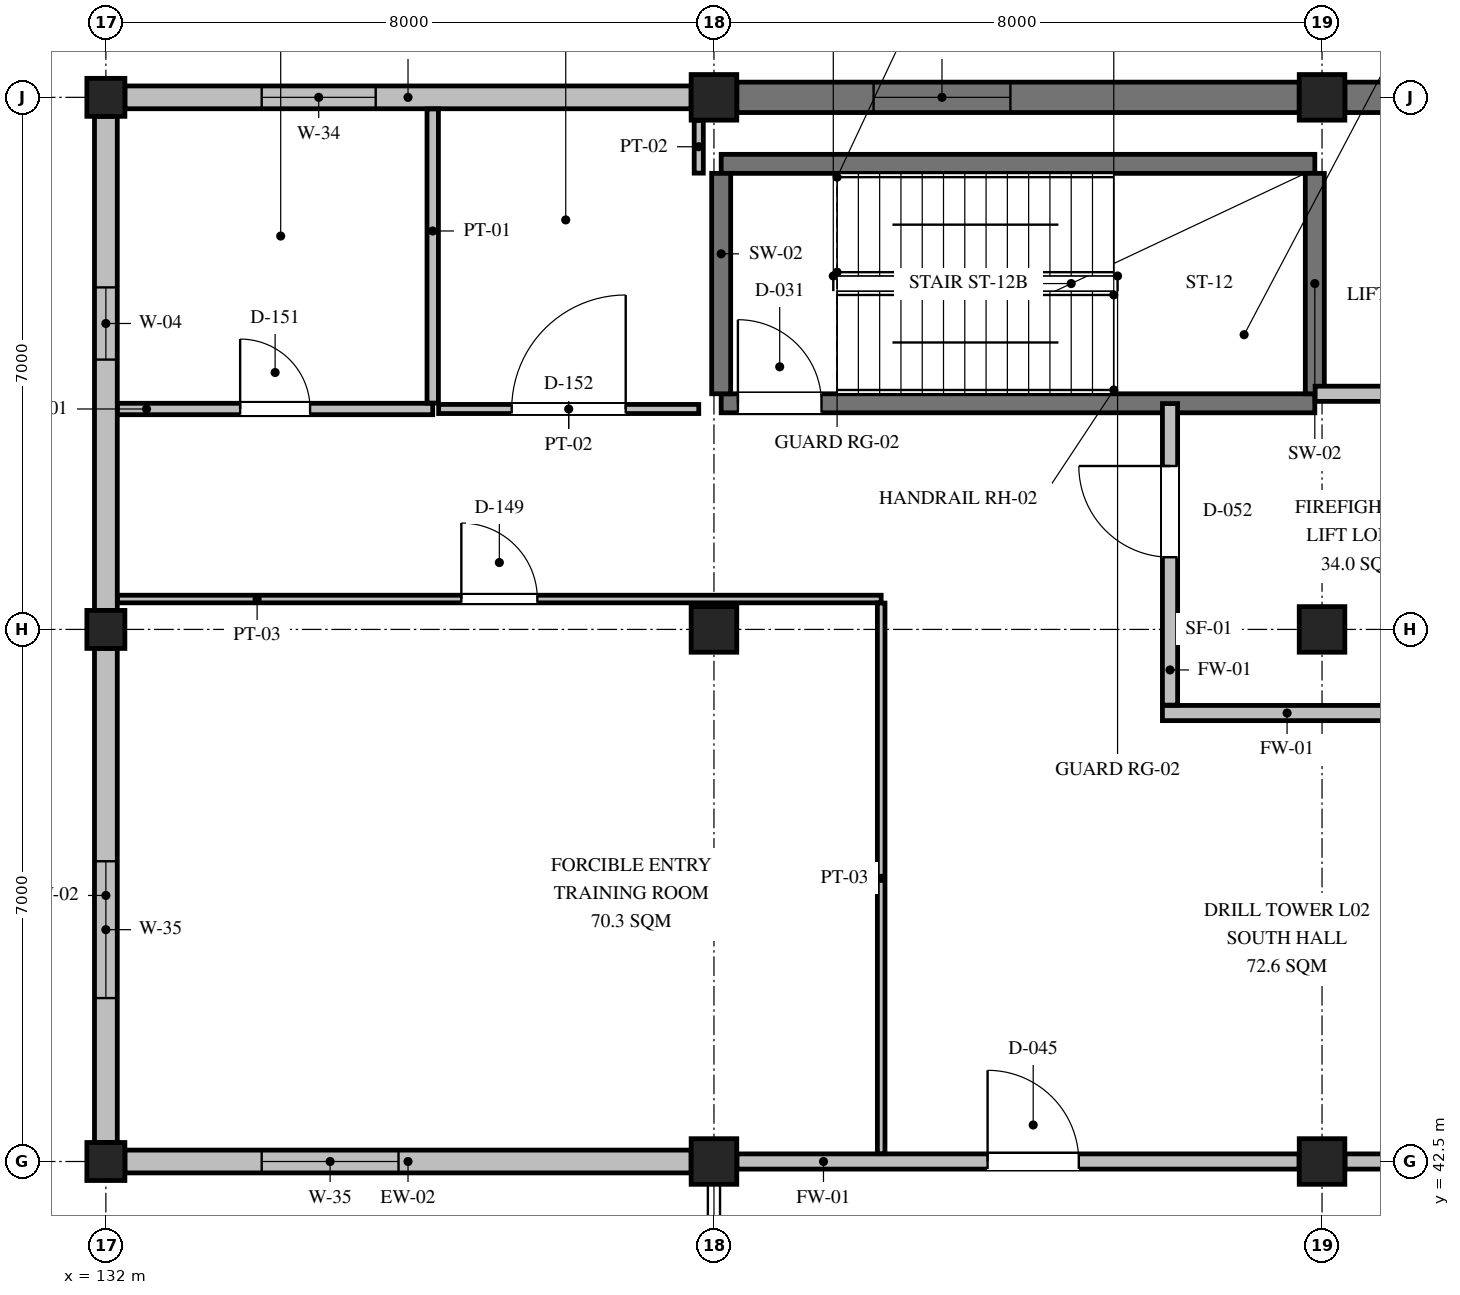
"""IFC4 building model, lengths in metres.
Left out: names, types, materials, properties, quantities, classifications, styles, units other than length and angle.
Written with IfcOpenShell. Run it as: python <this file> out.ifc"""

import sys

from ifc_helpers import new_model, si_unit, direction, frame, frame_2d, origin, origin_2d, place, context, subcontext, project, spatial, rectangle, extrude, element, fill, save


model = new_model("IFC4")
c1 = context("Model", 3, precision=1e-05, world=origin(), true_north=direction((0.0, 1.0)))
c2 = subcontext(c1, "Body", "Model", "MODEL_VIEW")
j1 = project(units=[si_unit("LENGTHUNIT", "METRE"), si_unit("PLANEANGLEUNIT", "RADIAN")], contexts=[c1])
p1 = place(None, origin())
s1 = spatial("IfcSite", under=j1, at=p1, CompositionType="ELEMENT")
p2 = place(p1, origin())
s2 = spatial("IfcBuilding", under=s1, at=p2, CompositionType="ELEMENT")
p3 = place(p2, frame((0.0, 0.0, 5.85)))
s3 = spatial("IfcBuildingStorey", under=s2, at=p3, CompositionType="ELEMENT", Elevation=5.85)
for number, where, z_axis, x_axis in (
    (1, (132.0, 42.5, 0.0), (0.0, 0.0, 1.0), (1.0, 0.0, 0.0)),
    (2, (132.0, 49.5, 0.0), (0.0, 0.0, 1.0), (1.0, 0.0, 0.0)),
    (3, (132.0, 56.5, 0.0), (0.0, 0.0, 1.0), (1.0, 0.0, 0.0)),
):
    element("IfcColumn", number, at=place(p3, frame(where, z_axis=z_axis, x_axis=x_axis)), inside=s3, PredefinedType="COLUMN", context=c2, shape_type="SweptSolid", body=[
        extrude(rectangle(XDim=0.5, YDim=0.5, at=origin_2d()), origin(), (0.0, 0.0, 1.0), 4.2),
    ])
for number, where, z_axis, x_axis in (
    (4, (140.0, 42.5, 0.0), (0.0, 0.0, 1.0), (1.0, 0.0, 0.0)),
    (5, (140.0, 49.5, 0.0), (0.0, 0.0, 1.0), (1.0, 0.0, 0.0)),
    (6, (140.0, 56.5, 0.0), (0.0, 0.0, 1.0), (1.0, 0.0, 0.0)),
    (7, (148.0, 42.5, 0.0), (0.0, 0.0, 1.0), (1.0, 0.0, 0.0)),
    (8, (148.0, 49.5, 0.0), (0.0, 0.0, 1.0), (1.0, 0.0, 0.0)),
    (9, (148.0, 56.5, 0.0), (0.0, 0.0, 1.0), (1.0, 0.0, 0.0)),
):
    element("IfcColumn", number, at=place(p3, frame(where, z_axis=z_axis, x_axis=x_axis)), inside=s3, PredefinedType="COLUMN", context=c2, shape_type="SweptSolid", body=[
        extrude(rectangle(XDim=0.6, YDim=0.6, at=origin_2d()), origin(), (0.0, 0.0, 1.0), 4.2),
    ])
p4 = place(p3, frame((132.25, 56.5, 0.0), z_axis=(0.0, 0.0, 1.0), x_axis=(1.0, 0.0, 0.0)))
e10 = element("IfcWall", 10, at=p4, inside=s3, PredefinedType="SOLIDWALL", context=c2, shape_type="SweptSolid", body=[
    extrude(rectangle(XDim=7.45, YDim=0.3, at=frame_2d((3.725, 0.0))), origin(), (0.0, 0.0, 1.0), 3.544),
])
p5 = place(p4, frame((1.8, 0.0, 0.9)))
e11 = element("IfcOpeningElement", 11, at=p5, cuts=e10, PredefinedType="OPENING", context=c2, shape_type="SweptSolid", body=[
    extrude(rectangle(XDim=1.5, YDim=2.1, at=frame_2d((0.75, 1.05))), frame((0.0, 0.16, 0.0), z_axis=(0.0, -1.0, 0.0), x_axis=(1.0, 0.0, 0.0)), (0.0, 0.0, 1.0), 0.32),
])
p6 = place(p3, frame((140.3, 56.5, 0.0), z_axis=(0.0, 0.0, 1.0), x_axis=(1.0, 0.0, 0.0)))
e12 = element("IfcWall", 12, at=p6, inside=s3, PredefinedType="SHEAR", context=c2, shape_type="SweptSolid", body=[
    extrude(rectangle(XDim=7.4, YDim=0.4, at=frame_2d((3.7, 0.0))), origin(), (0.0, 0.0, 1.0), 4.0),
])
p7 = place(p6, frame((1.8, 0.0, 0.9)))
e13 = element("IfcOpeningElement", 13, at=p7, cuts=e12, PredefinedType="OPENING", context=c2, shape_type="SweptSolid", body=[
    extrude(rectangle(XDim=1.8, YDim=2.1, at=frame_2d((0.9, 1.05))), frame((0.0, 0.21, 0.0), z_axis=(0.0, -1.0, 0.0), x_axis=(1.0, 0.0, 0.0)), (0.0, 0.0, 1.0), 0.42),
])
p8 = place(p3, frame((148.3, 56.5, 0.0), z_axis=(0.0, 0.0, 1.0), x_axis=(1.0, 0.0, 0.0)))
e14 = element("IfcWall", 14, at=p8, inside=s3, PredefinedType="SHEAR", context=c2, shape_type="SweptSolid", body=[
    extrude(rectangle(XDim=12.4, YDim=0.4, at=frame_2d((6.2, 0.0))), origin(), (0.0, 0.0, 1.0), 4.0),
])
p9 = place(p8, frame((1.8, 0.0, 0.9)))
e15 = element("IfcOpeningElement", 15, at=p9, cuts=e14, PredefinedType="OPENING", context=c2, shape_type="SweptSolid", body=[
    extrude(rectangle(XDim=2.1, YDim=2.1, at=frame_2d((1.05, 1.05))), frame((0.0, 0.21, 0.0), z_axis=(0.0, -1.0, 0.0), x_axis=(1.0, 0.0, 0.0)), (0.0, 0.0, 1.0), 0.42),
])
p10 = place(p3, frame((132.0, 42.75, 0.0), z_axis=(0.0, 0.0, 1.0), x_axis=(0.0, 1.0, 0.0)))
e16 = element("IfcWall", 16, at=p10, inside=s3, PredefinedType="SOLIDWALL", context=c2, shape_type="SweptSolid", body=[
    extrude(rectangle(XDim=6.5, YDim=0.3, at=frame_2d((3.25, 0.0))), origin(), (0.0, 0.0, 1.0), 3.564),
])
p11 = place(p10, frame((1.9, 0.0, 0.85)))
e17 = element("IfcOpeningElement", 17, at=p11, cuts=e16, PredefinedType="OPENING", context=c2, shape_type="SweptSolid", body=[
    extrude(rectangle(XDim=1.8, YDim=2.1, at=frame_2d((0.9, 1.05))), frame((0.0, 0.16, 0.0), z_axis=(0.0, -1.0, 0.0), x_axis=(1.0, 0.0, 0.0)), (0.0, 0.0, 1.0), 0.32),
])
p12 = place(p3, frame((132.0, 49.75, 0.0), z_axis=(0.0, 0.0, 1.0), x_axis=(0.0, 1.0, 0.0)))
e18 = element("IfcWall", 18, at=p12, inside=s3, PredefinedType="SOLIDWALL", context=c2, shape_type="SweptSolid", body=[
    extrude(rectangle(XDim=6.5, YDim=0.3, at=frame_2d((3.25, 0.0))), origin(), (0.0, 0.0, 1.0), 3.654),
])
p13 = place(p12, frame((3.3, 0.0, 1.05)))
e19 = element("IfcOpeningElement", 19, at=p13, cuts=e18, PredefinedType="OPENING", context=c2, shape_type="SweptSolid", body=[
    extrude(rectangle(XDim=0.95, YDim=0.95, at=frame_2d((0.475, 0.475))), frame((0.0, 0.16, 0.0), z_axis=(0.0, -1.0, 0.0), x_axis=(1.0, 0.0, 0.0)), (0.0, 0.0, 1.0), 0.32),
])
p14 = place(p3, frame((132.25, 42.5, 0.0), z_axis=(0.0, 0.0, 1.0), x_axis=(1.0, 0.0, 0.0)))
e20 = element("IfcWall", 20, at=p14, inside=s3, PredefinedType="SOLIDWALL", context=c2, shape_type="SweptSolid", body=[
    extrude(rectangle(XDim=7.45, YDim=0.3, at=frame_2d((3.725, 0.0))), origin(), (0.0, 0.0, 1.0), 3.454),
])
p15 = place(p14, frame((1.8, 0.0, 0.9)))
e21 = element("IfcOpeningElement", 21, at=p15, cuts=e20, PredefinedType="OPENING", context=c2, shape_type="SweptSolid", body=[
    extrude(rectangle(XDim=1.8, YDim=2.1, at=frame_2d((0.9, 1.05))), frame((0.0, 0.16, 0.0), z_axis=(0.0, -1.0, 0.0), x_axis=(1.0, 0.0, 0.0)), (0.0, 0.0, 1.0), 0.32),
])
p16 = place(p3, frame((140.095, 52.475, 0.0), z_axis=(0.0, 0.0, 1.0), x_axis=(1.0, 0.0, 0.0)))
e22 = element("IfcWall", 22, at=p16, inside=s3, PredefinedType="SHEAR", context=c2, shape_type="SweptSolid", body=[
    extrude(rectangle(XDim=7.81, YDim=0.25, at=frame_2d((3.905, 0.0))), origin(), (0.0, 0.0, 1.0), 4.0),
])
p17 = place(p16, frame((0.22, 0.0, 0.0)))
e23 = element("IfcOpeningElement", 23, at=p17, cuts=e22, PredefinedType="OPENING", context=c2, shape_type="SweptSolid", body=[
    extrude(rectangle(XDim=1.1, YDim=2.15, at=frame_2d((0.55, 1.075))), frame((0.0, 0.135, 0.0), z_axis=(0.0, -1.0, 0.0), x_axis=(1.0, 0.0, 0.0)), (0.0, 0.0, 1.0), 0.27),
])
p18 = place(p3, frame((140.095, 55.625, 0.0), z_axis=(0.0, 0.0, 1.0), x_axis=(1.0, 0.0, 0.0)))
e24 = element("IfcWall", 24, at=p18, inside=s3, PredefinedType="SHEAR", context=c2, shape_type="SweptSolid", body=[
    extrude(rectangle(XDim=7.81, YDim=0.25, at=frame_2d((3.905, 0.0))), origin(), (0.0, 0.0, 1.0), 4.0),
])
for number, where, z_axis, x_axis in (
    (25, (140.095, 52.6, 0.0), (0.0, 0.0, 1.0), (0.0, 1.0, 0.0)),
    (26, (147.905, 52.6, 0.0), (0.0, 0.0, 1.0), (0.0, 1.0, 0.0)),
):
    element("IfcWall", number, at=place(p3, frame(where, z_axis=z_axis, x_axis=x_axis)), inside=s3, PredefinedType="SHEAR", context=c2, shape_type="SweptSolid", body=[
        extrude(rectangle(XDim=2.9, YDim=0.25, at=frame_2d((1.45, 0.0))), origin(), (0.0, 0.0, 1.0), 4.0),
    ])
p19 = place(p3, frame((140.302, 42.5, 0.0), z_axis=(0.0, 0.0, 1.0), x_axis=(1.0, 0.0, 0.0)))
e27 = element("IfcWall", 27, at=p19, inside=s3, PredefinedType="PARTITIONING", context=c2, shape_type="SweptSolid", body=[
    extrude(rectangle(XDim=7.396, YDim=0.2, at=frame_2d((3.698, 0.0))), origin(), (0.0, 0.0, 1.0), 3.154),
])
p20 = place(p19, frame((3.298, 0.0, 0.0)))
e28 = element("IfcOpeningElement", 28, at=p20, cuts=e27, PredefinedType="OPENING", context=c2, shape_type="SweptSolid", body=[
    extrude(rectangle(XDim=1.2, YDim=2.15, at=frame_2d((0.6, 1.075))), frame((0.0, 0.11, 0.0), z_axis=(0.0, -1.0, 0.0), x_axis=(1.0, 0.0, 0.0)), (0.0, 0.0, 1.0), 0.22),
])
p21 = place(p3, frame((148.302, 42.5, 0.0), z_axis=(0.0, 0.0, 1.0), x_axis=(1.0, 0.0, 0.0)))
e29 = element("IfcWall", 29, at=p21, inside=s3, PredefinedType="PARTITIONING", context=c2, shape_type="SweptSolid", body=[
    extrude(rectangle(XDim=5.896, YDim=0.2, at=frame_2d((2.948, 0.0))), origin(), (0.0, 0.0, 1.0), 3.054),
])
p22 = place(p3, frame((147.909, 52.6, 0.0), z_axis=(0.0, 0.0, 1.0), x_axis=(1.0, 0.0, 0.0)))
e30 = element("IfcWall", 30, at=p22, inside=s3, PredefinedType="PARTITIONING", context=c2, shape_type="SweptSolid", body=[
    extrude(rectangle(XDim=1.362, YDim=0.2, at=frame_2d((0.681, 0.0))), origin(), (0.0, 0.0, 1.0), 4.0),
])
p23 = place(p3, frame((145.9, 48.4, 0.0), z_axis=(0.0, 0.0, 1.0), x_axis=(1.0, 0.0, 0.0)))
e31 = element("IfcWall", 31, at=p23, inside=s3, PredefinedType="PARTITIONING", context=c2, shape_type="SweptSolid", body=[
    extrude(rectangle(XDim=8.7, YDim=0.2, at=frame_2d((4.35, 0.0))), origin(), (0.0, 0.0, 1.0), 4.0),
])
p24 = place(p23, frame((4.3, 0.0, 0.0)))
e32 = element("IfcOpeningElement", 32, at=p24, cuts=e31, PredefinedType="OPENING", context=c2, shape_type="SweptSolid", body=[
    extrude(rectangle(XDim=1.2, YDim=2.15, at=frame_2d((0.6, 1.075))), frame((0.0, 0.11, 0.0), z_axis=(0.0, -1.0, 0.0), x_axis=(1.0, 0.0, 0.0)), (0.0, 0.0, 1.0), 0.22),
])
p25 = place(p3, frame((146.0, 48.504, 0.0), z_axis=(0.0, 0.0, 1.0), x_axis=(0.0, 1.0, 0.0)))
e33 = element("IfcWall", 33, at=p25, inside=s3, PredefinedType="PARTITIONING", context=c2, shape_type="SweptSolid", body=[
    extrude(rectangle(XDim=3.967, YDim=0.2, at=frame_2d((1.983, 0.0))), origin(), (0.0, 0.0, 1.0), 4.0),
])
p26 = place(p25, frame((1.946, 0.0, 0.0)))
e34 = element("IfcOpeningElement", 34, at=p26, cuts=e33, PredefinedType="OPENING", context=c2, shape_type="SweptSolid", body=[
    extrude(rectangle(XDim=1.2, YDim=2.15, at=frame_2d((0.6, 1.075))), frame((0.0, 0.11, 0.0), z_axis=(0.0, -1.0, 0.0), x_axis=(1.0, 0.0, 0.0)), (0.0, 0.0, 1.0), 0.22),
])
p27 = place(p3, frame((132.153, 49.9, 0.0), z_axis=(0.0, 0.0, 1.0), x_axis=(1.0, 0.0, 0.0)))
e35 = element("IfcWall", 35, at=p27, inside=s3, PredefinedType="PARTITIONING", context=c2, shape_type="SweptSolid", body=[
    extrude(rectangle(XDim=10.047, YDim=0.1, at=frame_2d((5.023, 0.0))), origin(), (0.0, 0.0, 1.0), 4.0),
])
p28 = place(p27, frame((4.523, 0.0, 0.0)))
e36 = element("IfcOpeningElement", 36, at=p28, cuts=e35, PredefinedType="OPENING", context=c2, shape_type="SweptSolid", body=[
    extrude(rectangle(XDim=1.0, YDim=2.1, at=frame_2d((0.5, 1.05))), frame((0.0, 0.06, 0.0), z_axis=(0.0, -1.0, 0.0), x_axis=(1.0, 0.0, 0.0)), (0.0, 0.0, 1.0), 0.12),
])
p29 = place(p3, frame((142.2, 42.603, 0.0), z_axis=(0.0, 0.0, 1.0), x_axis=(0.0, 1.0, 0.0)))
e37 = element("IfcWall", 37, at=p29, inside=s3, PredefinedType="PARTITIONING", context=c2, shape_type="SweptSolid", body=[
    extrude(rectangle(XDim=7.244, YDim=0.1, at=frame_2d((3.622, 0.0))), origin(), (0.0, 0.0, 1.0), 4.0),
])
p30 = place(p3, frame((132.153, 52.4, 0.0), z_axis=(0.0, 0.0, 1.0), x_axis=(1.0, 0.0, 0.0)))
e38 = element("IfcWall", 38, at=p30, inside=s3, PredefinedType="PARTITIONING", context=c2, shape_type="SweptSolid", body=[
    extrude(rectangle(XDim=4.147, YDim=0.15, at=frame_2d((2.073, 0.0))), origin(), (0.0, 0.0, 1.0), 4.0),
])
p31 = place(p30, frame((1.614, 0.0, 0.0)))
e39 = element("IfcOpeningElement", 39, at=p31, cuts=e38, PredefinedType="OPENING", context=c2, shape_type="SweptSolid", body=[
    extrude(rectangle(XDim=0.92, YDim=2.1, at=frame_2d((0.46, 1.05))), frame((0.0, 0.085, 0.0), z_axis=(0.0, -1.0, 0.0), x_axis=(1.0, 0.0, 0.0)), (0.0, 0.0, 1.0), 0.17),
])
p32 = place(p3, frame((136.3, 52.478, 0.0), z_axis=(0.0, 0.0, 1.0), x_axis=(0.0, 1.0, 0.0)))
e40 = element("IfcWall", 40, at=p32, inside=s3, PredefinedType="PARTITIONING", context=c2, shape_type="SweptSolid", body=[
    extrude(rectangle(XDim=3.869, YDim=0.15, at=frame_2d((1.935, 0.0))), origin(), (0.0, 0.0, 1.0), 4.0),
])
p33 = place(p3, frame((136.378, 52.4, 0.0), z_axis=(0.0, 0.0, 1.0), x_axis=(1.0, 0.0, 0.0)))
e41 = element("IfcWall", 41, at=p33, inside=s3, PredefinedType="PARTITIONING", context=c2, shape_type="SweptSolid", body=[
    extrude(rectangle(XDim=3.422, YDim=0.12, at=frame_2d((1.711, 0.0))), origin(), (0.0, 0.0, 1.0), 4.0),
])
p34 = place(p33, frame((0.961, 0.0, 0.0)))
e42 = element("IfcOpeningElement", 42, at=p34, cuts=e41, PredefinedType="OPENING", context=c2, shape_type="SweptSolid", body=[
    extrude(rectangle(XDim=1.5, YDim=2.25, at=frame_2d((0.75, 1.125))), frame((0.0, 0.07, 0.0), z_axis=(0.0, -1.0, 0.0), x_axis=(1.0, 0.0, 0.0)), (0.0, 0.0, 1.0), 0.14),
])
p35 = place(p3, frame((139.8, 55.503, 0.0), z_axis=(0.0, 0.0, 1.0), x_axis=(0.0, 1.0, 0.0)))
e43 = element("IfcWall", 43, at=p35, inside=s3, PredefinedType="PARTITIONING", context=c2, shape_type="SweptSolid", body=[
    extrude(rectangle(XDim=0.694, YDim=0.12, at=frame_2d((0.347, 0.0))), origin(), (0.0, 0.0, 1.0), 4.0),
])
p36 = place(p5, origin())
e44 = element("IfcWindow", 44, at=p36, inside=s3, PartitioningType="SINGLE_PANEL", PredefinedType="WINDOW", context=c2, shape_type="SweptSolid", body=[
    extrude(rectangle(XDim=1.5, YDim=2.1, at=frame_2d((0.75, 1.05))), frame((0.0, 0.03, 0.0), z_axis=(0.0, -1.0, 0.0), x_axis=(1.0, 0.0, 0.0)), (0.0, 0.0, 1.0), 0.06),
])
fill(e11, e44)
p37 = place(p7, origin())
e45 = element("IfcWindow", 45, at=p37, inside=s3, PartitioningType="SINGLE_PANEL", PredefinedType="WINDOW", context=c2, shape_type="SweptSolid", body=[
    extrude(rectangle(XDim=1.8, YDim=2.1, at=frame_2d((0.9, 1.05))), frame((0.0, 0.03, 0.0), z_axis=(0.0, -1.0, 0.0), x_axis=(1.0, 0.0, 0.0)), (0.0, 0.0, 1.0), 0.06),
])
fill(e13, e45)
p38 = place(p11, origin())
e46 = element("IfcWindow", 46, at=p38, inside=s3, PartitioningType="SINGLE_PANEL", PredefinedType="WINDOW", context=c2, shape_type="SweptSolid", body=[
    extrude(rectangle(XDim=1.8, YDim=2.1, at=frame_2d((0.9, 1.05))), frame((0.0, 0.03, 0.0), z_axis=(0.0, -1.0, 0.0), x_axis=(1.0, 0.0, 0.0)), (0.0, 0.0, 1.0), 0.06),
])
fill(e17, e46)
p39 = place(p13, origin())
e47 = element("IfcWindow", 47, at=p39, inside=s3, PartitioningType="SINGLE_PANEL", PredefinedType="WINDOW", context=c2, shape_type="SweptSolid", body=[
    extrude(rectangle(XDim=0.95, YDim=0.95, at=frame_2d((0.475, 0.475))), frame((0.0, 0.03, 0.0), z_axis=(0.0, -1.0, 0.0), x_axis=(1.0, 0.0, 0.0)), (0.0, 0.0, 1.0), 0.06),
])
fill(e19, e47)
p40 = place(p15, origin())
e48 = element("IfcWindow", 48, at=p40, inside=s3, PartitioningType="SINGLE_PANEL", PredefinedType="WINDOW", context=c2, shape_type="SweptSolid", body=[
    extrude(rectangle(XDim=1.8, YDim=2.1, at=frame_2d((0.9, 1.05))), frame((0.0, 0.03, 0.0), z_axis=(0.0, -1.0, 0.0), x_axis=(1.0, 0.0, 0.0)), (0.0, 0.0, 1.0), 0.06),
])
fill(e21, e48)
p41 = place(p17, frame((1.1, 0.0, 0.0), z_axis=(0.0, 0.0, 1.0), x_axis=(-1.0, 0.0, 0.0)))
e49 = element("IfcDoor", 49, at=p41, inside=s3, OperationType="SINGLE_SWING_LEFT", PredefinedType="DOOR", context=c2, shape_type="SweptSolid", body=[
    extrude(rectangle(XDim=1.1, YDim=2.15, at=frame_2d((0.55, 1.075))), frame((0.0, 0.025, 0.0), z_axis=(0.0, -1.0, 0.0), x_axis=(1.0, 0.0, 0.0)), (0.0, 0.0, 1.0), 0.05),
])
fill(e23, e49)
p42 = place(p20, origin())
e50 = element("IfcDoor", 50, at=p42, inside=s3, OperationType="SINGLE_SWING_LEFT", PredefinedType="DOOR", context=c2, shape_type="SweptSolid", body=[
    extrude(rectangle(XDim=1.2, YDim=2.15, at=frame_2d((0.6, 1.075))), frame((0.0, 0.025, 0.0), z_axis=(0.0, -1.0, 0.0), x_axis=(1.0, 0.0, 0.0)), (0.0, 0.0, 1.0), 0.05),
])
fill(e28, e50)
p43 = place(p26, origin())
e51 = element("IfcDoor", 51, at=p43, inside=s3, OperationType="SINGLE_SWING_RIGHT", PredefinedType="DOOR", context=c2, shape_type="SweptSolid", body=[
    extrude(rectangle(XDim=1.2, YDim=2.15, at=frame_2d((0.6, 1.075))), frame((0.0, 0.025, 0.0), z_axis=(0.0, -1.0, 0.0), x_axis=(1.0, 0.0, 0.0)), (0.0, 0.0, 1.0), 0.05),
])
fill(e34, e51)
p44 = place(p28, origin())
e52 = element("IfcDoor", 52, at=p44, inside=s3, OperationType="SINGLE_SWING_LEFT", PredefinedType="DOOR", context=c2, shape_type="SweptSolid", body=[
    extrude(rectangle(XDim=1.0, YDim=2.1, at=frame_2d((0.5, 1.05))), frame((0.0, 0.025, 0.0), z_axis=(0.0, -1.0, 0.0), x_axis=(1.0, 0.0, 0.0)), (0.0, 0.0, 1.0), 0.05),
])
fill(e36, e52)
p45 = place(p31, origin())
e53 = element("IfcDoor", 53, at=p45, inside=s3, OperationType="SINGLE_SWING_LEFT", PredefinedType="DOOR", context=c2, shape_type="SweptSolid", body=[
    extrude(rectangle(XDim=0.92, YDim=2.1, at=frame_2d((0.46, 1.05))), frame((0.0, 0.025, 0.0), z_axis=(0.0, -1.0, 0.0), x_axis=(1.0, 0.0, 0.0)), (0.0, 0.0, 1.0), 0.05),
])
fill(e39, e53)
p46 = place(p34, origin())
e54 = element("IfcDoor", 54, at=p46, inside=s3, OperationType="SINGLE_SWING_RIGHT", PredefinedType="DOOR", context=c2, shape_type="SweptSolid", body=[
    extrude(rectangle(XDim=1.5, YDim=2.25, at=frame_2d((0.75, 1.125))), frame((0.0, 0.025, 0.0), z_axis=(0.0, -1.0, 0.0), x_axis=(1.0, 0.0, 0.0)), (0.0, 0.0, 1.0), 0.05),
])
fill(e42, e54)
save(model, sys.argv[1])
